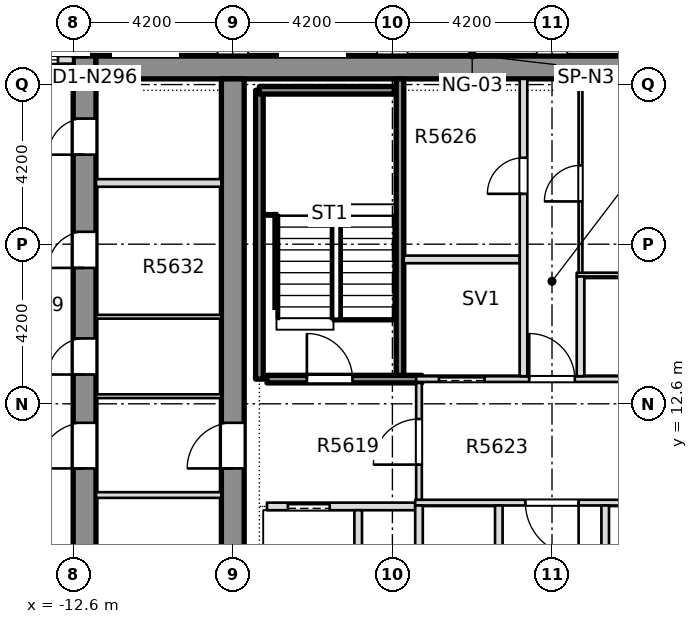
"""IFC4 building model, lengths in metres.
Left out: names, types, materials, properties, quantities, classifications, styles, units other than length and angle.
Written with IfcOpenShell. Run it as: python <this file> out.ifc"""

import sys

from ifc_helpers import new_model, si_unit, direction, frame, frame_2d, origin, place, context, subcontext, project, spatial, rectangle, extrude, element, fill, save


model = new_model("IFC4")
c1 = context("Model", 3, precision=1e-05, world=origin(), true_north=direction((0.0, 1.0)))
c2 = subcontext(c1, "Body", "Model", "MODEL_VIEW")
j1 = project(units=[si_unit("LENGTHUNIT", "METRE"), si_unit("PLANEANGLEUNIT", "RADIAN")], contexts=[c1])
p1 = place(None, origin())
s1 = spatial("IfcSite", under=j1, at=p1, CompositionType="ELEMENT")
p2 = place(p1, origin())
s2 = spatial("IfcBuilding", under=s1, at=p2, CompositionType="ELEMENT")
p3 = place(p2, frame((0.0, 0.0, 213.5)))
s3 = spatial("IfcBuildingStorey", under=s2, at=p3, CompositionType="ELEMENT", Elevation=213.5)
p4 = place(p3, frame((-12.3, -8.4, -0.4), z_axis=(0.0, 0.0, 1.0), x_axis=(0.0, 1.0, 0.0)))
e1 = element("IfcWall", 1, at=p4, inside=s3, PredefinedType="SHEAR", context=c2, shape_type="SweptSolid", body=[
    extrude(rectangle(XDim=30.15, YDim=0.6, at=frame_2d((15.075, 0.0))), origin(), (0.0, 0.0, 1.0), 3.4),
])
p5 = place(p4, frame((4.788, 0.0, 0.4)))
e2 = element("IfcOpeningElement", 2, at=p5, cuts=e1, PredefinedType="OPENING", context=c2, shape_type="SweptSolid", body=[
    extrude(rectangle(XDim=0.95, YDim=2.1, at=frame_2d((0.475, 1.05))), frame((0.0, 0.31, 0.0), z_axis=(0.0, -1.0, 0.0), x_axis=(1.0, 0.0, 0.0)), (0.0, 0.0, 1.0), 0.62),
])
p6 = place(p4, frame((13.638, 0.0, 0.4)))
e3 = element("IfcOpeningElement", 3, at=p6, cuts=e1, PredefinedType="OPENING", context=c2, shape_type="SweptSolid", body=[
    extrude(rectangle(XDim=0.95, YDim=2.1, at=frame_2d((0.475, 1.05))), frame((0.0, 0.31, 0.0), z_axis=(0.0, -1.0, 0.0), x_axis=(1.0, 0.0, 0.0)), (0.0, 0.0, 1.0), 0.62),
])
p7 = place(p4, frame((21.771, 0.0, 0.4)))
e4 = element("IfcOpeningElement", 4, at=p7, cuts=e1, PredefinedType="OPENING", context=c2, shape_type="SweptSolid", body=[
    extrude(rectangle(XDim=0.95, YDim=2.1, at=frame_2d((0.475, 1.05))), frame((0.0, 0.31, 0.0), z_axis=(0.0, -1.0, 0.0), x_axis=(1.0, 0.0, 0.0)), (0.0, 0.0, 1.0), 0.62),
])
p8 = place(p4, frame((24.576, 0.0, 0.4)))
e5 = element("IfcOpeningElement", 5, at=p8, cuts=e1, PredefinedType="OPENING", context=c2, shape_type="SweptSolid", body=[
    extrude(rectangle(XDim=0.95, YDim=2.1, at=frame_2d((0.475, 1.05))), frame((0.0, 0.31, 0.0), z_axis=(0.0, -1.0, 0.0), x_axis=(1.0, 0.0, 0.0)), (0.0, 0.0, 1.0), 0.62),
])
p9 = place(p4, frame((27.555, 0.0, 0.4)))
e6 = element("IfcOpeningElement", 6, at=p9, cuts=e1, PredefinedType="OPENING", context=c2, shape_type="SweptSolid", body=[
    extrude(rectangle(XDim=0.95, YDim=2.1, at=frame_2d((0.475, 1.05))), frame((0.0, 0.31, 0.0), z_axis=(0.0, -1.0, 0.0), x_axis=(1.0, 0.0, 0.0)), (0.0, 0.0, 1.0), 0.62),
])
p10 = place(p4, frame((19.3, 0.0, 0.4)))
e7 = element("IfcOpeningElement", 7, at=p10, cuts=e1, PredefinedType="OPENING", context=c2, shape_type="SweptSolid", body=[
    extrude(rectangle(XDim=1.2, YDim=2.1, at=frame_2d((0.6, 1.05))), frame((0.0, 0.31, 0.0), z_axis=(0.0, -1.0, 0.0), x_axis=(1.0, 0.0, 0.0)), (0.0, 0.0, 1.0), 0.62),
])
p11 = place(p3, frame((-12.0, 21.45, -0.4), z_axis=(0.0, 0.0, 1.0), x_axis=(1.0, 0.0, 0.0)))
e8 = element("IfcWall", 8, at=p11, inside=s3, PredefinedType="SHEAR", context=c2, shape_type="SweptSolid", body=[
    extrude(rectangle(XDim=24.0, YDim=0.6, at=frame_2d((12.0, 0.0))), origin(), (0.0, 0.0, 1.0), 3.4),
])
p12 = place(p3, frame((-8.4, -7.8, -0.4), z_axis=(0.0, 0.0, 1.0), x_axis=(0.0, 1.0, 0.0)))
e9 = element("IfcWall", 9, at=p12, inside=s3, PredefinedType="SHEAR", context=c2, shape_type="SweptSolid", body=[
    extrude(rectangle(XDim=28.95, YDim=0.6, at=frame_2d((14.475, 0.0))), origin(), (0.0, 0.0, 1.0), 3.4),
])
p13 = place(p12, frame((18.7, 0.0, 0.4)))
e10 = element("IfcOpeningElement", 10, at=p13, cuts=e9, PredefinedType="OPENING", context=c2, shape_type="SweptSolid", body=[
    extrude(rectangle(XDim=1.2, YDim=2.1, at=frame_2d((0.6, 1.05))), frame((0.0, 0.31, 0.0), z_axis=(0.0, -1.0, 0.0), x_axis=(1.0, 0.0, 0.0)), (0.0, 0.0, 1.0), 0.62),
])
p14 = place(p3, frame((-12.6, 21.65, 0.0), z_axis=(0.0, 0.0, 1.0), x_axis=(-1.0, 0.0, 0.0)))
e11 = element("IfcWall", 11, at=p14, inside=s3, PredefinedType="STANDARD", context=c2, shape_type="SweptSolid", body=[
    extrude(rectangle(XDim=3.7, YDim=0.2, at=frame_2d((1.85, 0.0))), origin(), (0.0, 0.0, 1.0), 3.0),
])
p15 = place(p14, frame((0.4, 0.0, 0.2)))
e12 = element("IfcOpeningElement", 12, at=p15, cuts=e11, PredefinedType="OPENING", context=c2, shape_type="SweptSolid", body=[
    extrude(rectangle(XDim=1.8, YDim=2.65, at=frame_2d((0.9, 1.325))), frame((0.0, 0.11, 0.0), z_axis=(0.0, -1.0, 0.0), x_axis=(1.0, 0.0, 0.0)), (0.0, 0.0, 1.0), 0.22),
])
p16 = place(p14, frame((2.3, 0.0, 0.0)))
e13 = element("IfcOpeningElement", 13, at=p16, cuts=e11, PredefinedType="OPENING", context=c2, shape_type="SweptSolid", body=[
    extrude(rectangle(XDim=1.0, YDim=2.4, at=frame_2d((0.5, 1.2))), frame((0.0, 0.11, 0.0), z_axis=(0.0, -1.0, 0.0), x_axis=(1.0, 0.0, 0.0)), (0.0, 0.0, 1.0), 0.22),
])
p17 = place(p3, frame((-7.5, 9.9, 0.0), z_axis=(0.0, 0.0, 1.0), x_axis=(1.0, 0.0, 0.0)))
e14 = element("IfcWall", 14, at=p17, inside=s3, PredefinedType="PARTITIONING", context=c2, shape_type="SweptSolid", body=[
    extrude(rectangle(XDim=3.9, YDim=0.2, at=frame_2d((1.95, 0.0))), origin(), (0.0, 0.0, 1.0), 3.0),
])
p18 = place(p17, frame((0.55, 0.0, 0.0)))
e15 = element("IfcOpeningElement", 15, at=p18, cuts=e14, PredefinedType="OPENING", context=c2, shape_type="SweptSolid", body=[
    extrude(rectangle(XDim=1.1, YDim=2.1, at=frame_2d((0.55, 1.05))), frame((0.0, 0.11, 0.0), z_axis=(0.0, -1.0, 0.0), x_axis=(1.0, 0.0, 0.0)), (0.0, 0.0, 1.0), 0.22),
])
p19 = place(p3, frame((-3.6, 10.0, 0.0), z_axis=(0.0, 0.0, 1.0), x_axis=(1.0, 0.0, 0.0)))
e16 = element("IfcWall", 16, at=p19, inside=s3, PredefinedType="PARTITIONING", context=c2, shape_type="SweptSolid", body=[
    extrude(rectangle(XDim=7.2, YDim=0.15, at=frame_2d((3.6, 0.0))), origin(), (0.0, 0.0, 1.0), 3.0),
])
p20 = place(p19, frame((2.9, 0.0, 0.0)))
e17 = element("IfcOpeningElement", 17, at=p20, cuts=e16, PredefinedType="OPENING", context=c2, shape_type="SweptSolid", body=[
    extrude(rectangle(XDim=1.4, YDim=2.1, at=frame_2d((0.7, 1.05))), frame((0.0, 0.085, 0.0), z_axis=(0.0, -1.0, 0.0), x_axis=(1.0, 0.0, 0.0)), (0.0, 0.0, 1.0), 0.17),
])
p21 = place(p3, frame((-7.5, 13.25, 0.0), z_axis=(0.0, 0.0, 1.0), x_axis=(1.0, 0.0, 0.0)))
e18 = element("IfcWall", 18, at=p21, inside=s3, PredefinedType="SOLIDWALL", context=c2, shape_type="SweptSolid", body=[
    extrude(rectangle(XDim=4.075, YDim=0.2, at=frame_2d((2.038, 0.0))), origin(), (0.0, 0.0, 1.0), 3.0),
])
p22 = place(p21, frame((1.05, 0.0, 0.0)))
e19 = element("IfcOpeningElement", 19, at=p22, cuts=e18, PredefinedType="OPENING", context=c2, shape_type="SweptSolid", body=[
    extrude(rectangle(XDim=1.2, YDim=2.1, at=frame_2d((0.6, 1.05))), frame((0.0, 0.11, 0.0), z_axis=(0.0, -1.0, 0.0), x_axis=(1.0, 0.0, 0.0)), (0.0, 0.0, 1.0), 0.22),
])
p23 = place(p3, frame((-3.575, 13.25, 0.0), z_axis=(0.0, 0.0, 1.0), x_axis=(1.0, 0.0, 0.0)))
e20 = element("IfcWall", 20, at=p23, inside=s3, PredefinedType="PARTITIONING", context=c2, shape_type="SweptSolid", body=[
    extrude(rectangle(XDim=7.15, YDim=0.15, at=frame_2d((3.575, 0.0))), origin(), (0.0, 0.0, 1.0), 3.0),
])
p24 = place(p23, frame((0.6, 0.0, 0.0)))
e21 = element("IfcOpeningElement", 21, at=p24, cuts=e20, PredefinedType="OPENING", context=c2, shape_type="SweptSolid", body=[
    extrude(rectangle(XDim=1.2, YDim=2.1, at=frame_2d((0.6, 1.05))), frame((0.0, 0.085, 0.0), z_axis=(0.0, -1.0, 0.0), x_axis=(1.0, 0.0, 0.0)), (0.0, 0.0, 1.0), 0.17),
])
p25 = place(p23, frame((5.4, 0.0, 0.0)))
e22 = element("IfcOpeningElement", 22, at=p25, cuts=e20, PredefinedType="OPENING", context=c2, shape_type="SweptSolid", body=[
    extrude(rectangle(XDim=1.1, YDim=2.1, at=frame_2d((0.55, 1.05))), frame((0.0, 0.085, 0.0), z_axis=(0.0, -1.0, 0.0), x_axis=(1.0, 0.0, 0.0)), (0.0, 0.0, 1.0), 0.17),
])
p26 = place(p23, frame((2.975, 0.0, 0.0)))
e23 = element("IfcOpeningElement", 23, at=p26, cuts=e20, PredefinedType="OPENING", context=c2, shape_type="SweptSolid", body=[
    extrude(rectangle(XDim=1.2, YDim=2.1, at=frame_2d((0.6, 1.05))), frame((0.0, 0.085, 0.0), z_axis=(0.0, -1.0, 0.0), x_axis=(1.0, 0.0, 0.0)), (0.0, 0.0, 1.0), 0.17),
])
p27 = place(p3, frame((0.65, 16.0, 0.0), z_axis=(0.0, 0.0, 1.0), x_axis=(1.0, 0.0, 0.0)))
e24 = element("IfcWall", 24, at=p27, inside=s3, PredefinedType="PARTITIONING", context=c2, shape_type="SweptSolid", body=[
    extrude(rectangle(XDim=3.45, YDim=0.1, at=frame_2d((1.725, 0.0))), origin(), (0.0, 0.0, 1.0), 3.0),
])
p28 = place(p3, frame((-3.9, 16.4, 0.0), z_axis=(0.0, 0.0, 1.0), x_axis=(1.0, 0.0, 0.0)))
e25 = element("IfcWall", 25, at=p28, inside=s3, PredefinedType="PARTITIONING", context=c2, shape_type="SweptSolid", body=[
    extrude(rectangle(XDim=3.05, YDim=0.2, at=frame_2d((1.525, 0.0))), origin(), (0.0, 0.0, 1.0), 3.0),
])
p29 = place(p3, frame((-5.1, 7.075, 0.0), z_axis=(0.0, 0.0, 1.0), x_axis=(0.0, 1.0, 0.0)))
e26 = element("IfcWall", 26, at=p29, inside=s3, PredefinedType="PARTITIONING", context=c2, shape_type="SweptSolid", body=[
    extrude(rectangle(XDim=2.725, YDim=0.2, at=frame_2d((1.363, 0.0))), origin(), (0.0, 0.0, 1.0), 3.0),
])
p30 = place(p3, frame((-4.0, 13.35, 0.0), z_axis=(0.0, 0.0, 1.0), x_axis=(0.0, 1.0, 0.0)))
e27 = element("IfcWall", 27, at=p30, inside=s3, PredefinedType="SOLIDWALL", context=c2, shape_type="SweptSolid", body=[
    extrude(rectangle(XDim=7.799, YDim=0.2, at=frame_2d((3.899, 0.0))), origin(), (0.0, 0.0, 1.0), 3.0),
])
p31 = place(p3, frame((-3.5, 7.075, 0.0), z_axis=(0.0, 0.0, 1.0), x_axis=(0.0, 1.0, 0.0)))
e28 = element("IfcWall", 28, at=p31, inside=s3, PredefinedType="PARTITIONING", context=c2, shape_type="SweptSolid", body=[
    extrude(rectangle(XDim=2.85, YDim=0.2, at=frame_2d((1.425, 0.0))), origin(), (0.0, 0.0, 1.0), 3.0),
])
p32 = place(p3, frame((-3.5, 10.075, 0.0), z_axis=(0.0, 0.0, 1.0), x_axis=(0.0, 1.0, 0.0)))
e29 = element("IfcWall", 29, at=p32, inside=s3, PredefinedType="PARTITIONING", context=c2, shape_type="SweptSolid", body=[
    extrude(rectangle(XDim=3.075, YDim=0.15, at=frame_2d((1.538, 0.0))), origin(), (0.0, 0.0, 1.0), 3.0),
])
p33 = place(p32, frame((0.925, 0.0, 0.0)))
e30 = element("IfcOpeningElement", 30, at=p33, cuts=e29, PredefinedType="OPENING", context=c2, shape_type="SweptSolid", body=[
    extrude(rectangle(XDim=1.2, YDim=2.1, at=frame_2d((0.6, 1.05))), frame((0.0, 0.085, 0.0), z_axis=(0.0, -1.0, 0.0), x_axis=(1.0, 0.0, 0.0)), (0.0, 0.0, 1.0), 0.17),
])
p34 = place(p3, frame((-1.4, 7.075, 0.0), z_axis=(0.0, 0.0, 1.0), x_axis=(0.0, 1.0, 0.0)))
e31 = element("IfcWall", 31, at=p34, inside=s3, PredefinedType="PARTITIONING", context=c2, shape_type="SweptSolid", body=[
    extrude(rectangle(XDim=2.85, YDim=0.2, at=frame_2d((1.425, 0.0))), origin(), (0.0, 0.0, 1.0), 3.0),
])
p35 = place(p3, frame((-0.75, 13.325, 0.0), z_axis=(0.0, 0.0, 1.0), x_axis=(0.0, 1.0, 0.0)))
e32 = element("IfcWall", 32, at=p35, inside=s3, PredefinedType="PARTITIONING", context=c2, shape_type="SweptSolid", body=[
    extrude(rectangle(XDim=7.824, YDim=0.2, at=frame_2d((3.912, 0.0))), origin(), (0.0, 0.0, 1.0), 3.0),
])
p36 = place(p35, frame((4.8, 0.0, 0.0)))
e33 = element("IfcOpeningElement", 33, at=p36, cuts=e32, PredefinedType="OPENING", context=c2, shape_type="SweptSolid", body=[
    extrude(rectangle(XDim=0.95, YDim=2.1, at=frame_2d((0.475, 1.05))), frame((0.0, 0.11, 0.0), z_axis=(0.0, -1.0, 0.0), x_axis=(1.0, 0.0, 0.0)), (0.0, 0.0, 1.0), 0.22),
])
p37 = place(p3, frame((0.75, 13.325, 0.0), z_axis=(0.0, 0.0, 1.0), x_axis=(0.0, 1.0, 0.0)))
e34 = element("IfcWall", 34, at=p37, inside=s3, PredefinedType="PARTITIONING", context=c2, shape_type="SweptSolid", body=[
    extrude(rectangle(XDim=2.625, YDim=0.2, at=frame_2d((1.312, 0.0))), origin(), (0.0, 0.0, 1.0), 3.0),
])
p38 = place(p3, frame((0.75, 16.05, 0.0), z_axis=(0.0, 0.0, 1.0), x_axis=(0.0, 1.0, 0.0)))
e35 = element("IfcWall", 35, at=p38, inside=s3, PredefinedType="PARTITIONING", context=c2, shape_type="SweptSolid", body=[
    extrude(rectangle(XDim=5.099, YDim=0.1, at=frame_2d((2.549, 0.0))), origin(), (0.0, 0.0, 1.0), 3.0),
])
p39 = place(p38, frame((1.875, 0.0, 0.0)))
e36 = element("IfcOpeningElement", 36, at=p39, cuts=e35, PredefinedType="OPENING", context=c2, shape_type="SweptSolid", body=[
    extrude(rectangle(XDim=0.95, YDim=2.1, at=frame_2d((0.475, 1.05))), frame((0.0, 0.06, 0.0), z_axis=(0.0, -1.0, 0.0), x_axis=(1.0, 0.0, 0.0)), (0.0, 0.0, 1.0), 0.12),
])
p40 = place(p3, frame((1.4, 7.075, 0.0), z_axis=(0.0, 0.0, 1.0), x_axis=(0.0, 1.0, 0.0)))
e37 = element("IfcWall", 37, at=p40, inside=s3, PredefinedType="PARTITIONING", context=c2, shape_type="SweptSolid", body=[
    extrude(rectangle(XDim=2.85, YDim=0.2, at=frame_2d((1.425, 0.0))), origin(), (0.0, 0.0, 1.0), 3.0),
])
p41 = place(p3, frame((-11.999, 10.2, 0.0), z_axis=(0.0, 0.0, 1.0), x_axis=(1.0, 0.0, 0.0)))
e38 = element("IfcWall", 38, at=p41, inside=s3, PredefinedType="PARTITIONING", context=c2, shape_type="SweptSolid", body=[
    extrude(rectangle(XDim=3.298, YDim=0.15, at=frame_2d((1.649, 0.0))), origin(), (0.0, 0.0, 1.0), 3.0),
])
for number, where, z_axis, x_axis in (
    (39, (-11.999, 12.8, 0.0), (0.0, 0.0, 1.0), (1.0, 0.0, 0.0)),
    (40, (-11.999, 14.891, 0.0), (0.0, 0.0, 1.0), (1.0, 0.0, 0.0)),
):
    element("IfcWall", number, at=place(p3, frame(where, z_axis=z_axis, x_axis=x_axis)), inside=s3, PredefinedType="PARTITIONING", context=c2, shape_type="SweptSolid", body=[
        extrude(rectangle(XDim=3.298, YDim=0.1, at=frame_2d((1.649, 0.0))), origin(), (0.0, 0.0, 1.0), 3.0),
    ])
p42 = place(p3, frame((-11.999, 18.411, 0.0), z_axis=(0.0, 0.0, 1.0), x_axis=(1.0, 0.0, 0.0)))
e41 = element("IfcWall", 41, at=p42, inside=s3, PredefinedType="PARTITIONING", context=c2, shape_type="SweptSolid", body=[
    extrude(rectangle(XDim=3.298, YDim=0.2, at=frame_2d((1.649, 0.0))), origin(), (0.0, 0.0, 1.0), 3.0),
])
p43 = place(p3, frame((-7.7, 13.25, 0.0), z_axis=(0.0, 0.0, 1.0), x_axis=(0.0, 1.0, 0.0)))
e42 = element("IfcWall", 42, at=p43, inside=s3, PredefinedType="SOLIDWALL", context=c2, shape_type="SweptSolid", body=[
    extrude(rectangle(XDim=7.6, YDim=0.2, at=frame_2d((3.8, 0.0))), origin(), (0.0, 0.0, 1.0), 3.0),
])
p44 = place(p3, frame((-7.7, 20.85, 0.0), z_axis=(0.0, 0.0, 1.0), x_axis=(1.0, 0.0, 0.0)))
e43 = element("IfcWall", 43, at=p44, inside=s3, PredefinedType="SOLIDWALL", context=c2, shape_type="SweptSolid", body=[
    extrude(rectangle(XDim=3.55, YDim=0.2, at=frame_2d((1.775, 0.0))), origin(), (0.0, 0.0, 1.0), 3.0),
])
p45 = place(p15, origin())
e44 = element("IfcWindow", 44, at=p45, inside=s3, PartitioningType="SINGLE_PANEL", PredefinedType="WINDOW", context=c2, shape_type="SweptSolid", body=[
    extrude(rectangle(XDim=1.8, YDim=2.65, at=frame_2d((0.9, 1.325))), frame((0.0, 0.03, 0.0), z_axis=(0.0, -1.0, 0.0), x_axis=(1.0, 0.0, 0.0)), (0.0, 0.0, 1.0), 0.06),
])
fill(e12, e44)
p46 = place(p22, origin())
e45 = element("IfcDoor", 45, at=p46, inside=s3, OperationType="SINGLE_SWING_LEFT", PredefinedType="DOOR", context=c2, shape_type="SweptSolid", body=[
    extrude(rectangle(XDim=1.2, YDim=2.1, at=frame_2d((0.6, 1.05))), frame((0.0, 0.025, 0.0), z_axis=(0.0, -1.0, 0.0), x_axis=(1.0, 0.0, 0.0)), (0.0, 0.0, 1.0), 0.05),
])
fill(e19, e45)
p47 = place(p18, origin())
e46 = element("IfcDoor", 46, at=p47, inside=s3, OperationType="SLIDING_TO_RIGHT", PredefinedType="DOOR", context=c2, shape_type="SweptSolid", body=[
    extrude(rectangle(XDim=1.1, YDim=2.1, at=frame_2d((0.55, 1.05))), frame((0.0, 0.025, 0.0), z_axis=(0.0, -1.0, 0.0), x_axis=(1.0, 0.0, 0.0)), (0.0, 0.0, 1.0), 0.05),
])
fill(e15, e46)
p48 = place(p20, origin())
e47 = element("IfcDoor", 47, at=p48, inside=s3, OperationType="SINGLE_SWING_RIGHT", PredefinedType="DOOR", context=c2, shape_type="SweptSolid", body=[
    extrude(rectangle(XDim=1.4, YDim=2.1, at=frame_2d((0.7, 1.05))), frame((0.0, 0.025, 0.0), z_axis=(0.0, -1.0, 0.0), x_axis=(1.0, 0.0, 0.0)), (0.0, 0.0, 1.0), 0.05),
])
fill(e17, e47)
p49 = place(p24, origin())
e48 = element("IfcDoor", 48, at=p49, inside=s3, OperationType="SLIDING_TO_RIGHT", PredefinedType="DOOR", context=c2, shape_type="SweptSolid", body=[
    extrude(rectangle(XDim=1.2, YDim=2.1, at=frame_2d((0.6, 1.05))), frame((0.0, 0.025, 0.0), z_axis=(0.0, -1.0, 0.0), x_axis=(1.0, 0.0, 0.0)), (0.0, 0.0, 1.0), 0.05),
])
fill(e21, e48)
p50 = place(p26, origin())
e49 = element("IfcDoor", 49, at=p50, inside=s3, OperationType="SINGLE_SWING_RIGHT", PredefinedType="DOOR", context=c2, shape_type="SweptSolid", body=[
    extrude(rectangle(XDim=1.2, YDim=2.1, at=frame_2d((0.6, 1.05))), frame((0.0, 0.025, 0.0), z_axis=(0.0, -1.0, 0.0), x_axis=(1.0, 0.0, 0.0)), (0.0, 0.0, 1.0), 0.05),
])
fill(e23, e49)
p51 = place(p36, origin())
e50 = element("IfcDoor", 50, at=p51, inside=s3, OperationType="SINGLE_SWING_RIGHT", PredefinedType="DOOR", context=c2, shape_type="SweptSolid", body=[
    extrude(rectangle(XDim=0.95, YDim=2.1, at=frame_2d((0.475, 1.05))), frame((0.0, 0.025, 0.0), z_axis=(0.0, -1.0, 0.0), x_axis=(1.0, 0.0, 0.0)), (0.0, 0.0, 1.0), 0.05),
])
fill(e33, e50)
p52 = place(p39, origin())
e51 = element("IfcDoor", 51, at=p52, inside=s3, OperationType="SINGLE_SWING_LEFT", PredefinedType="DOOR", context=c2, shape_type="SweptSolid", body=[
    extrude(rectangle(XDim=0.95, YDim=2.1, at=frame_2d((0.475, 1.05))), frame((0.0, 0.025, 0.0), z_axis=(0.0, -1.0, 0.0), x_axis=(1.0, 0.0, 0.0)), (0.0, 0.0, 1.0), 0.05),
])
fill(e36, e51)
p53 = place(p33, origin())
e52 = element("IfcDoor", 52, at=p53, inside=s3, OperationType="SINGLE_SWING_RIGHT", PredefinedType="DOOR", context=c2, shape_type="SweptSolid", body=[
    extrude(rectangle(XDim=1.2, YDim=2.1, at=frame_2d((0.6, 1.05))), frame((0.0, 0.025, 0.0), z_axis=(0.0, -1.0, 0.0), x_axis=(1.0, 0.0, 0.0)), (0.0, 0.0, 1.0), 0.05),
])
fill(e30, e52)
p54 = place(p7, origin())
e53 = element("IfcDoor", 53, at=p54, inside=s3, OperationType="SINGLE_SWING_LEFT", PredefinedType="DOOR", context=c2, shape_type="SweptSolid", body=[
    extrude(rectangle(XDim=0.95, YDim=2.1, at=frame_2d((0.475, 1.05))), frame((0.0, 0.025, 0.0), z_axis=(0.0, -1.0, 0.0), x_axis=(1.0, 0.0, 0.0)), (0.0, 0.0, 1.0), 0.05),
])
fill(e4, e53)
p55 = place(p8, origin())
e54 = element("IfcDoor", 54, at=p55, inside=s3, OperationType="SINGLE_SWING_LEFT", PredefinedType="DOOR", context=c2, shape_type="SweptSolid", body=[
    extrude(rectangle(XDim=0.95, YDim=2.1, at=frame_2d((0.475, 1.05))), frame((0.0, 0.025, 0.0), z_axis=(0.0, -1.0, 0.0), x_axis=(1.0, 0.0, 0.0)), (0.0, 0.0, 1.0), 0.05),
])
fill(e5, e54)
p56 = place(p9, origin())
e55 = element("IfcDoor", 55, at=p56, inside=s3, OperationType="SINGLE_SWING_LEFT", PredefinedType="DOOR", context=c2, shape_type="SweptSolid", body=[
    extrude(rectangle(XDim=0.95, YDim=2.1, at=frame_2d((0.475, 1.05))), frame((0.0, 0.025, 0.0), z_axis=(0.0, -1.0, 0.0), x_axis=(1.0, 0.0, 0.0)), (0.0, 0.0, 1.0), 0.05),
])
fill(e6, e55)
p57 = place(p10, origin())
e56 = element("IfcDoor", 56, at=p57, inside=s3, OperationType="SINGLE_SWING_LEFT", PredefinedType="DOOR", context=c2, shape_type="SweptSolid", body=[
    extrude(rectangle(XDim=1.2, YDim=2.1, at=frame_2d((0.6, 1.05))), frame((0.0, 0.025, 0.0), z_axis=(0.0, -1.0, 0.0), x_axis=(1.0, 0.0, 0.0)), (0.0, 0.0, 1.0), 0.05),
])
fill(e7, e56)
p58 = place(p13, origin())
e57 = element("IfcDoor", 57, at=p58, inside=s3, OperationType="SINGLE_SWING_LEFT", PredefinedType="DOOR", context=c2, shape_type="SweptSolid", body=[
    extrude(rectangle(XDim=1.2, YDim=2.1, at=frame_2d((0.6, 1.05))), frame((0.0, 0.025, 0.0), z_axis=(0.0, -1.0, 0.0), x_axis=(1.0, 0.0, 0.0)), (0.0, 0.0, 1.0), 0.05),
])
fill(e10, e57)
save(model, sys.argv[1])
